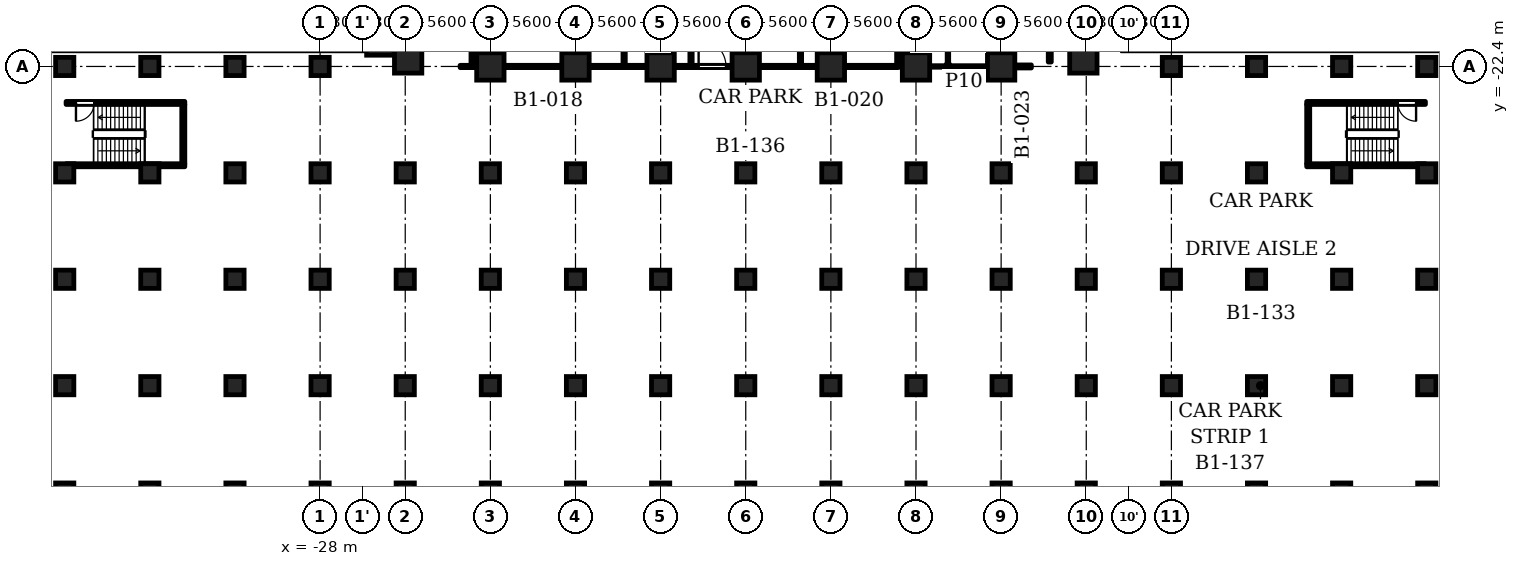
"""IFC4 building model, lengths in metres.
Left out: names, types, materials, properties, quantities, classifications, styles, units other than length and angle.
Written with IfcOpenShell. Run it as: python <this file> out.ifc"""

import sys

from ifc_helpers import new_model, si_unit, direction, frame, frame_2d, origin, origin_2d, place, context, subcontext, project, spatial, rectangle, circle, extrude, element, fill, save


model = new_model("IFC4")
c1 = context("Model", 3, precision=1e-05, world=origin(), true_north=direction((0.0, 1.0)))
c2 = subcontext(c1, "Body", "Model", "MODEL_VIEW")
j1 = project(units=[si_unit("LENGTHUNIT", "METRE"), si_unit("PLANEANGLEUNIT", "RADIAN")], contexts=[c1])
p1 = place(None, origin())
s1 = spatial("IfcSite", under=j1, at=p1, CompositionType="ELEMENT")
p2 = place(p1, origin())
s2 = spatial("IfcBuilding", under=s1, at=p2, CompositionType="ELEMENT")
p3 = place(p2, frame((0.0, 0.0, -4.5)))
s3 = spatial("IfcBuildingStorey", under=s2, at=p3, CompositionType="ELEMENT", Elevation=-4.5)
for number, where, z_axis, x_axis in (
    (1, (-22.209, -21.938, 0.0), (0.0, 0.0, 1.0), (1.0, 0.0, 0.0)),
    (2, (-16.8, -22.4, 0.0), (0.0, 0.0, 1.0), (1.0, 0.0, 0.0)),
    (3, (-11.2, -22.4, 0.0), (0.0, 0.0, 1.0), (1.0, 0.0, 0.0)),
    (4, (-5.6, -22.4, 0.0), (0.0, 0.0, 1.0), (1.0, 0.0, 0.0)),
    (5, (0.0, -22.4, 0.0), (0.0, 0.0, 1.0), (1.0, 0.0, 0.0)),
    (6, (5.6, -22.4, 0.0), (0.0, 0.0, 1.0), (1.0, 0.0, 0.0)),
    (7, (11.2, -22.4, 0.0), (0.0, 0.0, 1.0), (1.0, 0.0, 0.0)),
    (8, (16.8, -22.4, 0.0), (0.0, 0.0, 1.0), (1.0, 0.0, 0.0)),
    (9, (22.209, -21.938, 0.0), (0.0, 0.0, 1.0), (1.0, 0.0, 0.0)),
    (10, (-24.04, -20.76, 0.0), (0.0, 0.0, 1.0), (1.0, 0.0, 0.0)),
):
    element("IfcColumn", number, at=place(p3, frame(where, z_axis=z_axis, x_axis=x_axis)), inside=s3, PredefinedType="COLUMN", context=c2, shape_type="SweptSolid", body=[
        extrude(rectangle(XDim=1.8, YDim=1.8, at=origin_2d()), origin(), (0.0, 0.0, 1.0), 4.5),
    ])
for number, where, z_axis, x_axis in (
    (11, (-44.8, -29.4, 0.0), (0.0, 0.0, 1.0), (1.0, 0.0, 0.0)),
    (12, (-39.2, -29.4, 0.0), (0.0, 0.0, 1.0), (1.0, 0.0, 0.0)),
    (13, (-33.6, -29.4, 0.0), (0.0, 0.0, 1.0), (1.0, 0.0, 0.0)),
    (14, (-28.0, -29.4, 0.0), (0.0, 0.0, 1.0), (1.0, 0.0, 0.0)),
    (15, (-22.4, -29.4, 0.0), (0.0, 0.0, 1.0), (1.0, 0.0, 0.0)),
    (16, (-16.8, -29.4, 0.0), (0.0, 0.0, 1.0), (1.0, 0.0, 0.0)),
    (17, (-11.2, -29.4, 0.0), (0.0, 0.0, 1.0), (1.0, 0.0, 0.0)),
    (18, (-5.6, -29.4, 0.0), (0.0, 0.0, 1.0), (1.0, 0.0, 0.0)),
    (19, (0.0, -29.4, 0.0), (0.0, 0.0, 1.0), (1.0, 0.0, 0.0)),
    (20, (5.6, -29.4, 0.0), (0.0, 0.0, 1.0), (1.0, 0.0, 0.0)),
    (21, (11.2, -29.4, 0.0), (0.0, 0.0, 1.0), (1.0, 0.0, 0.0)),
    (22, (16.8, -29.4, 0.0), (0.0, 0.0, 1.0), (1.0, 0.0, 0.0)),
    (23, (22.4, -29.4, 0.0), (0.0, 0.0, 1.0), (1.0, 0.0, 0.0)),
    (24, (28.0, -29.4, 0.0), (0.0, 0.0, 1.0), (1.0, 0.0, 0.0)),
    (25, (33.6, -29.4, 0.0), (0.0, 0.0, 1.0), (1.0, 0.0, 0.0)),
    (26, (39.2, -29.4, 0.0), (0.0, 0.0, 1.0), (1.0, 0.0, 0.0)),
    (27, (44.8, -29.4, 0.0), (0.0, 0.0, 1.0), (1.0, 0.0, 0.0)),
    (28, (-44.8, -36.4, 0.0), (0.0, 0.0, 1.0), (1.0, 0.0, 0.0)),
    (29, (-39.2, -36.4, 0.0), (0.0, 0.0, 1.0), (1.0, 0.0, 0.0)),
    (30, (-33.6, -36.4, 0.0), (0.0, 0.0, 1.0), (1.0, 0.0, 0.0)),
    (31, (-28.0, -36.4, 0.0), (0.0, 0.0, 1.0), (1.0, 0.0, 0.0)),
    (32, (-22.4, -36.4, 0.0), (0.0, 0.0, 1.0), (1.0, 0.0, 0.0)),
    (33, (-16.8, -36.4, 0.0), (0.0, 0.0, 1.0), (1.0, 0.0, 0.0)),
    (34, (-11.2, -36.4, 0.0), (0.0, 0.0, 1.0), (1.0, 0.0, 0.0)),
    (35, (-5.6, -36.4, 0.0), (0.0, 0.0, 1.0), (1.0, 0.0, 0.0)),
    (36, (0.0, -36.4, 0.0), (0.0, 0.0, 1.0), (1.0, 0.0, 0.0)),
    (37, (5.6, -36.4, 0.0), (0.0, 0.0, 1.0), (1.0, 0.0, 0.0)),
    (38, (11.2, -36.4, 0.0), (0.0, 0.0, 1.0), (1.0, 0.0, 0.0)),
    (39, (16.8, -36.4, 0.0), (0.0, 0.0, 1.0), (1.0, 0.0, 0.0)),
    (40, (22.4, -36.4, 0.0), (0.0, 0.0, 1.0), (1.0, 0.0, 0.0)),
    (41, (28.0, -36.4, 0.0), (0.0, 0.0, 1.0), (1.0, 0.0, 0.0)),
    (42, (33.6, -36.4, 0.0), (0.0, 0.0, 1.0), (1.0, 0.0, 0.0)),
    (43, (39.2, -36.4, 0.0), (0.0, 0.0, 1.0), (1.0, 0.0, 0.0)),
    (44, (44.8, -36.4, 0.0), (0.0, 0.0, 1.0), (1.0, 0.0, 0.0)),
    (45, (-44.8, -43.4, 0.0), (0.0, 0.0, 1.0), (1.0, 0.0, 0.0)),
    (46, (-39.2, -43.4, 0.0), (0.0, 0.0, 1.0), (1.0, 0.0, 0.0)),
    (47, (-33.6, -43.4, 0.0), (0.0, 0.0, 1.0), (1.0, 0.0, 0.0)),
    (48, (-28.0, -43.4, 0.0), (0.0, 0.0, 1.0), (1.0, 0.0, 0.0)),
    (49, (-22.4, -43.4, 0.0), (0.0, 0.0, 1.0), (1.0, 0.0, 0.0)),
    (50, (-16.8, -43.4, 0.0), (0.0, 0.0, 1.0), (1.0, 0.0, 0.0)),
    (51, (-11.2, -43.4, 0.0), (0.0, 0.0, 1.0), (1.0, 0.0, 0.0)),
    (52, (-5.6, -43.4, 0.0), (0.0, 0.0, 1.0), (1.0, 0.0, 0.0)),
    (53, (0.0, -43.4, 0.0), (0.0, 0.0, 1.0), (1.0, 0.0, 0.0)),
    (54, (5.6, -43.4, 0.0), (0.0, 0.0, 1.0), (1.0, 0.0, 0.0)),
    (55, (11.2, -43.4, 0.0), (0.0, 0.0, 1.0), (1.0, 0.0, 0.0)),
    (56, (16.8, -43.4, 0.0), (0.0, 0.0, 1.0), (1.0, 0.0, 0.0)),
    (57, (22.4, -43.4, 0.0), (0.0, 0.0, 1.0), (1.0, 0.0, 0.0)),
    (58, (28.0, -43.4, 0.0), (0.0, 0.0, 1.0), (1.0, 0.0, 0.0)),
    (59, (33.6, -43.4, 0.0), (0.0, 0.0, 1.0), (1.0, 0.0, 0.0)),
    (60, (39.2, -43.4, 0.0), (0.0, 0.0, 1.0), (1.0, 0.0, 0.0)),
    (61, (44.8, -43.4, 0.0), (0.0, 0.0, 1.0), (1.0, 0.0, 0.0)),
    (62, (-44.8, -50.4, 0.0), (0.0, 0.0, 1.0), (1.0, 0.0, 0.0)),
    (63, (-39.2, -50.4, 0.0), (0.0, 0.0, 1.0), (1.0, 0.0, 0.0)),
    (64, (-33.6, -50.4, 0.0), (0.0, 0.0, 1.0), (1.0, 0.0, 0.0)),
    (65, (-28.0, -50.4, 0.0), (0.0, 0.0, 1.0), (1.0, 0.0, 0.0)),
    (66, (-22.4, -50.4, 0.0), (0.0, 0.0, 1.0), (1.0, 0.0, 0.0)),
    (67, (-16.8, -50.4, 0.0), (0.0, 0.0, 1.0), (1.0, 0.0, 0.0)),
    (68, (-11.2, -50.4, 0.0), (0.0, 0.0, 1.0), (1.0, 0.0, 0.0)),
    (69, (-5.6, -50.4, 0.0), (0.0, 0.0, 1.0), (1.0, 0.0, 0.0)),
    (70, (0.0, -50.4, 0.0), (0.0, 0.0, 1.0), (1.0, 0.0, 0.0)),
    (71, (5.6, -50.4, 0.0), (0.0, 0.0, 1.0), (1.0, 0.0, 0.0)),
    (72, (11.2, -50.4, 0.0), (0.0, 0.0, 1.0), (1.0, 0.0, 0.0)),
    (73, (16.8, -50.4, 0.0), (0.0, 0.0, 1.0), (1.0, 0.0, 0.0)),
    (74, (22.4, -50.4, 0.0), (0.0, 0.0, 1.0), (1.0, 0.0, 0.0)),
    (75, (28.0, -50.4, 0.0), (0.0, 0.0, 1.0), (1.0, 0.0, 0.0)),
    (76, (33.6, -50.4, 0.0), (0.0, 0.0, 1.0), (1.0, 0.0, 0.0)),
    (77, (39.2, -50.4, 0.0), (0.0, 0.0, 1.0), (1.0, 0.0, 0.0)),
    (78, (44.8, -50.4, 0.0), (0.0, 0.0, 1.0), (1.0, 0.0, 0.0)),
    (79, (-44.8, -22.4, 0.0), (0.0, 0.0, 1.0), (1.0, 0.0, 0.0)),
    (80, (-39.2, -22.4, 0.0), (0.0, 0.0, 1.0), (1.0, 0.0, 0.0)),
    (81, (-33.6, -22.4, 0.0), (0.0, 0.0, 1.0), (1.0, 0.0, 0.0)),
    (82, (-28.0, -22.4, 0.0), (0.0, 0.0, 1.0), (1.0, 0.0, 0.0)),
    (83, (28.0, -22.4, 0.0), (0.0, 0.0, 1.0), (1.0, 0.0, 0.0)),
    (84, (33.6, -22.4, 0.0), (0.0, 0.0, 1.0), (1.0, 0.0, 0.0)),
    (85, (39.2, -22.4, 0.0), (0.0, 0.0, 1.0), (1.0, 0.0, 0.0)),
    (86, (44.8, -22.4, 0.0), (0.0, 0.0, 1.0), (1.0, 0.0, 0.0)),
):
    element("IfcColumn", number, at=place(p3, frame(where, z_axis=z_axis, x_axis=x_axis)), inside=s3, PredefinedType="COLUMN", context=c2, shape_type="SweptSolid", body=[
        extrude(circle(Radius=0.6, at=origin_2d()), origin(), (0.0, 0.0, 1.0), 4.5),
    ])
for number, where, z_axis, x_axis in (
    (87, (-44.71, -28.9, 0.0), (0.0, 0.0, 1.0), (1.0, 0.0, 0.0)),
    (88, (36.9, -28.9, 0.0), (0.0, 0.0, 1.0), (1.0, 0.0, 0.0)),
):
    element("IfcWall", number, at=place(p3, frame(where, z_axis=z_axis, x_axis=x_axis)), inside=s3, PredefinedType="SHEAR", context=c2, shape_type="SweptSolid", body=[
        extrude(rectangle(XDim=7.81, YDim=0.2, at=frame_2d((3.905, 0.0))), origin(), (0.0, 0.0, 1.0), 4.05),
    ])
p4 = place(p3, frame((-44.71, -24.8, 0.0), z_axis=(0.0, 0.0, 1.0), x_axis=(1.0, 0.0, 0.0)))
e89 = element("IfcWall", 89, at=p4, inside=s3, PredefinedType="SHEAR", context=c2, shape_type="SweptSolid", body=[
    extrude(rectangle(XDim=7.81, YDim=0.2, at=frame_2d((3.905, 0.0))), origin(), (0.0, 0.0, 1.0), 4.05),
])
p5 = place(p4, frame((0.65, 0.0, 0.0)))
e90 = element("IfcOpeningElement", 90, at=p5, cuts=e89, PredefinedType="OPENING", context=c2, shape_type="SweptSolid", body=[
    extrude(rectangle(XDim=1.2, YDim=2.1, at=frame_2d((0.6, 1.05))), frame((0.0, 0.11, 0.0), z_axis=(0.0, -1.0, 0.0), x_axis=(1.0, 0.0, 0.0)), (0.0, 0.0, 1.0), 0.22),
])
p6 = place(p3, frame((36.9, -24.8, 0.0), z_axis=(0.0, 0.0, 1.0), x_axis=(1.0, 0.0, 0.0)))
e91 = element("IfcWall", 91, at=p6, inside=s3, PredefinedType="SHEAR", context=c2, shape_type="SweptSolid", body=[
    extrude(rectangle(XDim=7.81, YDim=0.2, at=frame_2d((3.905, 0.0))), origin(), (0.0, 0.0, 1.0), 4.05),
])
p7 = place(p6, frame((5.997, 0.0, 0.0)))
e92 = element("IfcOpeningElement", 92, at=p7, cuts=e91, PredefinedType="OPENING", context=c2, shape_type="SweptSolid", body=[
    extrude(rectangle(XDim=1.2, YDim=2.1, at=frame_2d((0.6, 1.05))), frame((0.0, 0.11, 0.0), z_axis=(0.0, -1.0, 0.0), x_axis=(1.0, 0.0, 0.0)), (0.0, 0.0, 1.0), 0.22),
])
p8 = place(p3, frame((10.0, -22.4, 0.0), z_axis=(0.0, 0.0, 1.0), x_axis=(1.0, 0.0, 0.0)))
e93 = element("IfcWall", 93, at=p8, inside=s3, PredefinedType="PARTITIONING", context=c2, shape_type="SweptSolid", body=[
    extrude(rectangle(XDim=6.6, YDim=0.1, at=frame_2d((3.3, 0.0))), origin(), (0.0, 0.0, 1.0), 3.15),
])
p9 = place(p3, frame((-18.79, -22.4, 0.0), z_axis=(0.0, 0.0, 1.0), x_axis=(1.0, 0.0, 0.0)))
e94 = element("IfcWall", 94, at=p9, inside=s3, PredefinedType="PARTITIONING", context=c2, shape_type="SweptSolid", body=[
    extrude(rectangle(XDim=28.79, YDim=0.15, at=frame_2d((14.395, 0.0))), origin(), (0.0, 0.0, 1.0), 3.15),
])
p10 = place(p9, frame((15.69, 0.0, 0.0)))
e95 = element("IfcOpeningElement", 95, at=p10, cuts=e94, PredefinedType="OPENING", context=c2, shape_type="SweptSolid", body=[
    extrude(rectangle(XDim=1.8, YDim=2.1, at=frame_2d((0.9, 1.05))), frame((0.0, 0.085, 0.0), z_axis=(0.0, -1.0, 0.0), x_axis=(1.0, 0.0, 0.0)), (0.0, 0.0, 1.0), 0.17),
])
p11 = place(p3, frame((16.6, -22.4, 0.0), z_axis=(0.0, 0.0, 1.0), x_axis=(1.0, 0.0, 0.0)))
e96 = element("IfcWall", 96, at=p11, inside=s3, PredefinedType="PARTITIONING", context=c2, shape_type="SweptSolid", body=[
    extrude(rectangle(XDim=2.19, YDim=0.2, at=frame_2d((1.095, 0.0))), origin(), (0.0, 0.0, 1.0), 3.15),
])
p12 = place(p3, frame((-37.0, -28.8, 0.0), z_axis=(0.0, 0.0, 1.0), x_axis=(0.0, 1.0, 0.0)))
e97 = element("IfcWall", 97, at=p12, inside=s3, PredefinedType="SHEAR", context=c2, shape_type="SweptSolid", body=[
    extrude(rectangle(XDim=3.9, YDim=0.2, at=frame_2d((1.95, 0.0))), origin(), (0.0, 0.0, 1.0), 4.05),
])
for number, where, z_axis, x_axis in (
    (98, (-18.0, -22.325, 0.0), (0.0, 0.0, 1.0), (0.0, 1.0, 0.0)),
    (99, (-8.0, -22.325, 0.0), (0.0, 0.0, 1.0), (0.0, 1.0, 0.0)),
    (100, (-3.6, -22.325, 0.0), (0.0, 0.0, 1.0), (0.0, 1.0, 0.0)),
    (101, (3.6, -22.325, 0.0), (0.0, 0.0, 1.0), (0.0, 1.0, 0.0)),
):
    element("IfcWall", number, at=place(p3, frame(where, z_axis=z_axis, x_axis=x_axis)), inside=s3, PredefinedType="PARTITIONING", context=c2, shape_type="SweptSolid", body=[
        extrude(rectangle(XDim=6.65, YDim=0.15, at=frame_2d((3.325, 0.0))), origin(), (0.0, 0.0, 1.0), 4.05),
    ])
p13 = place(p3, frame((10.0, -22.35, 0.0), z_axis=(0.0, 0.0, 1.0), x_axis=(0.0, 1.0, 0.0)))
e102 = element("IfcWall", 102, at=p13, inside=s3, PredefinedType="PARTITIONING", context=c2, shape_type="SweptSolid", body=[
    extrude(rectangle(XDim=6.675, YDim=0.15, at=frame_2d((3.337, 0.0))), origin(), (0.0, 0.0, 1.0), 4.05),
])
p14 = place(p3, frame((13.3, -22.35, 0.0), z_axis=(0.0, 0.0, 1.0), x_axis=(0.0, 1.0, 0.0)))
e103 = element("IfcWall", 103, at=p14, inside=s3, PredefinedType="PARTITIONING", context=c2, shape_type="SweptSolid", body=[
    extrude(rectangle(XDim=6.675, YDim=0.1, at=frame_2d((3.337, 0.0))), origin(), (0.0, 0.0, 1.0), 4.05),
])
p15 = place(p3, frame((16.6, -22.35, 0.0), z_axis=(0.0, 0.0, 1.0), x_axis=(0.0, 1.0, 0.0)))
e104 = element("IfcWall", 104, at=p15, inside=s3, PredefinedType="PARTITIONING", context=c2, shape_type="SweptSolid", body=[
    extrude(rectangle(XDim=6.675, YDim=0.2, at=frame_2d((3.337, 0.0))), origin(), (0.0, 0.0, 1.0), 4.05),
])
p16 = place(p3, frame((20.0, -22.11, 0.0), z_axis=(0.0, 0.0, 1.0), x_axis=(0.0, 1.0, 0.0)))
e105 = element("IfcWall", 105, at=p16, inside=s3, PredefinedType="PARTITIONING", context=c2, shape_type="SweptSolid", body=[
    extrude(rectangle(XDim=6.41, YDim=0.2, at=frame_2d((3.205, 0.0))), origin(), (0.0, 0.0, 1.0), 4.05),
])
p17 = place(p3, frame((37.0, -28.8, 0.0), z_axis=(0.0, 0.0, 1.0), x_axis=(0.0, 1.0, 0.0)))
e106 = element("IfcWall", 106, at=p17, inside=s3, PredefinedType="SHEAR", context=c2, shape_type="SweptSolid", body=[
    extrude(rectangle(XDim=3.9, YDim=0.2, at=frame_2d((1.95, 0.0))), origin(), (0.0, 0.0, 1.0), 4.05),
])
p18 = place(p10, origin())
e107 = element("IfcDoor", 107, at=p18, inside=s3, OperationType="SINGLE_SWING_RIGHT", PredefinedType="DOOR", context=c2, shape_type="SweptSolid", body=[
    extrude(rectangle(XDim=1.8, YDim=2.1, at=frame_2d((0.9, 1.05))), frame((0.0, 0.025, 0.0), z_axis=(0.0, -1.0, 0.0), x_axis=(1.0, 0.0, 0.0)), (0.0, 0.0, 1.0), 0.05),
])
fill(e95, e107)
p19 = place(p5, origin())
e108 = element("IfcDoor", 108, at=p19, inside=s3, OperationType="SINGLE_SWING_LEFT", PredefinedType="DOOR", context=c2, shape_type="SweptSolid", body=[
    extrude(rectangle(XDim=1.2, YDim=2.1, at=frame_2d((0.6, 1.05))), frame((0.0, 0.025, 0.0), z_axis=(0.0, -1.0, 0.0), x_axis=(1.0, 0.0, 0.0)), (0.0, 0.0, 1.0), 0.05),
])
fill(e90, e108)
p20 = place(p7, origin())
e109 = element("IfcDoor", 109, at=p20, inside=s3, OperationType="SINGLE_SWING_RIGHT", PredefinedType="DOOR", context=c2, shape_type="SweptSolid", body=[
    extrude(rectangle(XDim=1.2, YDim=2.1, at=frame_2d((0.6, 1.05))), frame((0.0, 0.025, 0.0), z_axis=(0.0, -1.0, 0.0), x_axis=(1.0, 0.0, 0.0)), (0.0, 0.0, 1.0), 0.05),
])
fill(e92, e109)
save(model, sys.argv[1])
